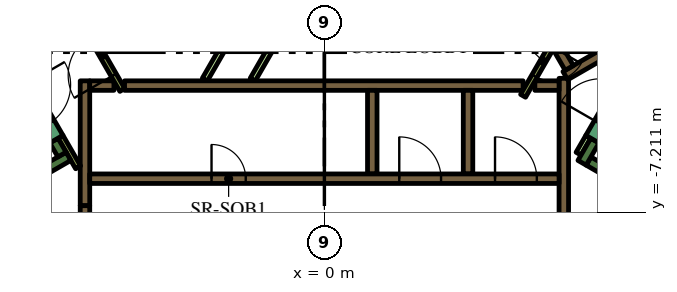
"""IFC4 building model, lengths in metres.
Left out: names, types, materials, properties, quantities, classifications, styles, units other than length and angle.
Written with IfcOpenShell. Run it as: python <this file> out.ifc"""

import sys

from ifc_helpers import new_model, si_unit, direction, frame, frame_2d, origin, place, context, subcontext, project, spatial, rectangle, extrude, element, fill, save


model = new_model("IFC4")
c1 = context("Model", 3, precision=1e-05, world=origin(), true_north=direction((0.0, 1.0)))
c2 = subcontext(c1, "Body", "Model", "MODEL_VIEW")
j1 = project(units=[si_unit("LENGTHUNIT", "METRE"), si_unit("PLANEANGLEUNIT", "RADIAN")], contexts=[c1])
p1 = place(None, origin())
s1 = spatial("IfcSite", under=j1, at=p1, CompositionType="ELEMENT")
p2 = place(p1, origin())
s2 = spatial("IfcBuilding", under=s1, at=p2, CompositionType="ELEMENT")
p3 = place(p2, frame((0.0, 0.0, 70.5)))
s3 = spatial("IfcBuildingStorey", under=s2, at=p3, CompositionType="ELEMENT", Elevation=70.5)
p4 = place(p3, frame((6.461, 13.909, 0.0), z_axis=(0.0, 0.0, 1.0), x_axis=(0.500005804227, -0.866022052686, 0.0)))
e1 = element("IfcWall", 1, at=p4, inside=s3, PredefinedType="SOLIDWALL", context=c2, shape_type="SweptSolid", body=[
    extrude(rectangle(XDim=20.834, YDim=0.9, at=frame_2d((10.417, 0.0))), origin(), (0.0, 0.0, 1.0), 3.9),
])
p5 = place(p3, frame((12.84, -9.261, 0.0), z_axis=(0.0, 0.0, 1.0), x_axis=(-0.866013990052, 0.500019768644, 0.0)))
e2 = element("IfcWall", 2, at=p5, inside=s3, PredefinedType="SOLIDWALL", context=c2, shape_type="SweptSolid", body=[
    extrude(rectangle(XDim=6.8, YDim=0.25, at=frame_2d((3.4, 0.0))), origin(), (0.0, 0.0, 1.0), 3.9),
])
p6 = place(p3, frame((6.78, -5.906, 0.0), z_axis=(0.0, 0.0, 1.0), x_axis=(0.500223362819, 0.865896406789, 0.0)))
e3 = element("IfcWall", 3, at=p6, inside=s3, PredefinedType="SOLIDWALL", context=c2, shape_type="SweptSolid", body=[
    extrude(rectangle(XDim=0.675, YDim=0.25, at=frame_2d((0.337, 0.0))), origin(), (0.0, 0.0, 1.0), 3.9),
])
p7 = place(p3, frame((-12.84, -9.261, 0.0), z_axis=(0.0, 0.0, 1.0), x_axis=(0.866016039709, 0.500016218704, 0.0)))
e4 = element("IfcWall", 4, at=p7, inside=s3, PredefinedType="SOLIDWALL", context=c2, shape_type="SweptSolid", body=[
    extrude(rectangle(XDim=7.05, YDim=0.25, at=frame_2d((3.525, 0.0))), origin(), (0.0, 0.0, 1.0), 3.9),
])
p8 = place(p3, frame((-6.905, -5.69, 0.0), z_axis=(0.0, 0.0, 1.0), x_axis=(-0.500402024738, 0.865793170242, 0.0)))
e5 = element("IfcWall", 5, at=p8, inside=s3, PredefinedType="SOLIDWALL", context=c2, shape_type="SweptSolid", body=[
    extrude(rectangle(XDim=0.425, YDim=0.25, at=frame_2d((0.212, 0.0))), origin(), (0.0, 0.0, 1.0), 3.9),
])
p9 = place(p3, frame((-5.259, -3.875, 0.0), z_axis=(0.0, 0.0, 1.0), x_axis=(1.0, 0.0, 0.0)))
e6 = element("IfcWall", 6, at=p9, inside=s3, PredefinedType="SOLIDWALL", context=c2, shape_type="SweptSolid", body=[
    extrude(rectangle(XDim=10.489, YDim=0.25, at=frame_2d((5.244, 0.0))), origin(), (0.0, 0.0, 1.0), 3.9),
])
for number, where, z_axis, x_axis in (
    (7, (3.78, -4.0, 0.0), (0.0, 0.0, 1.0), (0.0, -1.0, 0.0)),
    (8, (1.26, -4.0, 0.0), (0.0, 0.0, 1.0), (0.0, -1.0, 0.0)),
):
    element("IfcWall", number, at=place(p3, frame(where, z_axis=z_axis, x_axis=x_axis)), inside=s3, PredefinedType="SOLIDWALL", context=c2, shape_type="SweptSolid", body=[
        extrude(rectangle(XDim=2.2, YDim=0.25, at=frame_2d((1.1, 0.0))), origin(), (0.0, 0.0, 1.0), 3.9),
    ])
p10 = place(p3, frame((-6.3, -7.035, 0.0), z_axis=(0.0, 0.0, 1.0), x_axis=(0.0, 1.0, 0.0)))
e9 = element("IfcWall", 9, at=p10, inside=s3, PredefinedType="SOLIDWALL", context=c2, shape_type="SweptSolid", body=[
    extrude(rectangle(XDim=3.285, YDim=0.25, at=frame_2d((1.643, 0.0))), origin(), (0.0, 0.0, 1.0), 3.9),
])
p11 = place(p3, frame((-6.175, -3.875, 0.0), z_axis=(0.0, 0.0, 1.0), x_axis=(1.0, 0.0, 0.0)))
e10 = element("IfcWall", 10, at=p11, inside=s3, PredefinedType="SOLIDWALL", context=c2, shape_type="SweptSolid", body=[
    extrude(rectangle(XDim=0.637, YDim=0.25, at=frame_2d((0.318, 0.0))), origin(), (0.0, 0.0, 1.0), 3.9),
])
p12 = place(p3, frame((6.3, -7.27, 0.0), z_axis=(0.0, 0.0, 1.0), x_axis=(0.0, 1.0, 0.0)))
e11 = element("IfcWall", 11, at=p12, inside=s3, PredefinedType="SOLIDWALL", context=c2, shape_type="SweptSolid", body=[
    extrude(rectangle(XDim=3.586, YDim=0.25, at=frame_2d((1.793, 0.0))), origin(), (0.0, 0.0, 1.0), 3.9),
])
p13 = place(p3, frame((5.538, -3.875, 0.0), z_axis=(0.0, 0.0, 1.0), x_axis=(1.0, 0.0, 0.0)))
e12 = element("IfcWall", 12, at=p13, inside=s3, PredefinedType="SOLIDWALL", context=c2, shape_type="SweptSolid", body=[
    extrude(rectangle(XDim=0.637, YDim=0.25, at=frame_2d((0.318, 0.0))), origin(), (0.0, 0.0, 1.0), 3.9),
])
p14 = place(p3, frame((9.346, -1.879, 0.0), z_axis=(0.0, 0.0, 1.0), x_axis=(-0.866048528039, -0.499959945477, 0.0)))
e13 = element("IfcWall", 13, at=p14, inside=s3, PredefinedType="SOLIDWALL", context=c2, shape_type="SweptSolid", body=[
    extrude(rectangle(XDim=3.47, YDim=0.25, at=frame_2d((1.735, 0.0))), origin(), (0.0, 0.0, 1.0), 3.9),
])
p15 = place(p3, frame((6.13, -2.867, 0.0), z_axis=(0.0, 0.0, 1.0), x_axis=(0.500160776593, -0.865932559475, 0.0)))
e14 = element("IfcWall", 14, at=p15, inside=s3, PredefinedType="SOLIDWALL", context=c2, shape_type="SweptSolid", body=[
    extrude(rectangle(XDim=0.627, YDim=0.25, at=frame_2d((0.313, 0.0))), origin(), (0.0, 0.0, 1.0), 3.9),
])
p16 = place(p3, frame((-6.48, -6.027, 0.0), z_axis=(0.0, 0.0, 1.0), x_axis=(-0.499927229454, 0.866067413802, 0.0)))
e15 = element("IfcWall", 15, at=p16, inside=s3, PredefinedType="PARTITIONING", context=c2, shape_type="SweptSolid", body=[
    extrude(rectangle(XDim=0.929, YDim=0.15, at=frame_2d((0.464, 0.0))), origin(), (0.0, 0.0, 1.0), 3.9),
])
p17 = place(p3, frame((-3.147, -3.718, 0.0), z_axis=(0.0, 0.0, 1.0), x_axis=(0.500010131483, 0.866019554291, 0.0)))
e16 = element("IfcWall", 16, at=p17, inside=s3, PredefinedType="PARTITIONING", context=c2, shape_type="SweptSolid", body=[
    extrude(rectangle(XDim=3.894, YDim=0.15, at=frame_2d((1.947, 0.0))), origin(), (0.0, 0.0, 1.0), 2.75),
])
p18 = place(p3, frame((6.945, -5.222, 0.0), z_axis=(0.0, 0.0, 1.0), x_axis=(-0.499818422106, -0.866130212453, 0.0)))
e17 = element("IfcWall", 17, at=p18, inside=s3, PredefinedType="PARTITIONING", context=c2, shape_type="SweptSolid", body=[
    extrude(rectangle(XDim=0.514, YDim=0.15, at=frame_2d((0.257, 0.0))), origin(), (0.0, 0.0, 1.0), 2.75),
])
p19 = place(p3, frame((-1.887, -3.718, 0.0), z_axis=(0.0, 0.0, 1.0), x_axis=(0.500005008002, 0.866022512394, 0.0)))
e18 = element("IfcWall", 18, at=p19, inside=s3, PredefinedType="PARTITIONING", context=c2, shape_type="SweptSolid", body=[
    extrude(rectangle(XDim=8.327, YDim=0.15, at=frame_2d((4.164, 0.0))), origin(), (0.0, 0.0, 1.0), 2.75),
])
p20 = place(p3, frame((-6.175, -6.325, 0.0), z_axis=(0.0, 0.0, 1.0), x_axis=(1.0, 0.0, 0.0)))
e19 = element("IfcWall", 19, at=p20, inside=s3, PredefinedType="SOLIDWALL", context=c2, shape_type="SweptSolid", body=[
    extrude(rectangle(XDim=12.35, YDim=0.25, at=frame_2d((6.175, 0.0))), origin(), (0.0, 0.0, 1.0), 3.9),
])
p21 = place(p20, frame((3.205, 0.0, 0.0)))
e20 = element("IfcOpeningElement", 20, at=p21, cuts=e19, PredefinedType="OPENING", context=c2, shape_type="SweptSolid", body=[
    extrude(rectangle(XDim=0.9, YDim=2.1, at=frame_2d((0.45, 1.05))), frame((0.0, 0.135, 0.0), z_axis=(0.0, -1.0, 0.0), x_axis=(1.0, 0.0, 0.0)), (0.0, 0.0, 1.0), 0.27),
])
p22 = place(p20, frame((8.145, 0.0, 0.0)))
e21 = element("IfcOpeningElement", 21, at=p22, cuts=e19, PredefinedType="OPENING", context=c2, shape_type="SweptSolid", body=[
    extrude(rectangle(XDim=1.1, YDim=2.1, at=frame_2d((0.55, 1.05))), frame((0.0, 0.135, 0.0), z_axis=(0.0, -1.0, 0.0), x_axis=(1.0, 0.0, 0.0)), (0.0, 0.0, 1.0), 0.27),
])
p23 = place(p20, frame((10.665, 0.0, 0.0)))
e22 = element("IfcOpeningElement", 22, at=p23, cuts=e19, PredefinedType="OPENING", context=c2, shape_type="SweptSolid", body=[
    extrude(rectangle(XDim=1.1, YDim=2.1, at=frame_2d((0.55, 1.05))), frame((0.0, 0.135, 0.0), z_axis=(0.0, -1.0, 0.0), x_axis=(1.0, 0.0, 0.0)), (0.0, 0.0, 1.0), 0.27),
])
p24 = place(p3, frame((7.053, -5.284, 0.0), z_axis=(0.0, 0.0, 1.0), x_axis=(0.500078061341, 0.865980330357, 0.0)))
e23 = element("IfcWall", 23, at=p24, inside=s3, PredefinedType="SOLIDWALL", context=c2, shape_type="SweptSolid", body=[
    extrude(rectangle(XDim=2.1, YDim=0.4, at=frame_2d((1.05, 0.0))), origin(), (0.0, 0.0, 1.0), 3.9),
])
p25 = place(p24, frame((0.45, 0.0, 0.0)))
e24 = element("IfcOpeningElement", 24, at=p25, cuts=e23, PredefinedType="OPENING", context=c2, shape_type="SweptSolid", body=[
    extrude(rectangle(XDim=1.2, YDim=2.1, at=frame_2d((0.6, 1.05))), frame((0.0, 0.21, 0.0), z_axis=(0.0, -1.0, 0.0), x_axis=(1.0, 0.0, 0.0)), (0.0, 0.0, 1.0), 0.42),
])
p26 = place(p3, frame((-8.103, -3.466, 0.0), z_axis=(0.0, 0.0, 1.0), x_axis=(0.500078061341, -0.865980330357, 0.0)))
e25 = element("IfcWall", 25, at=p26, inside=s3, PredefinedType="SOLIDWALL", context=c2, shape_type="SweptSolid", body=[
    extrude(rectangle(XDim=2.1, YDim=0.4, at=frame_2d((1.05, 0.0))), origin(), (0.0, 0.0, 1.0), 3.9),
])
p27 = place(p26, frame((0.45, 0.0, 0.0)))
e26 = element("IfcOpeningElement", 26, at=p27, cuts=e25, PredefinedType="OPENING", context=c2, shape_type="SweptSolid", body=[
    extrude(rectangle(XDim=1.2, YDim=2.1, at=frame_2d((0.6, 1.05))), frame((0.0, 0.21, 0.0), z_axis=(0.0, -1.0, 0.0), x_axis=(1.0, 0.0, 0.0)), (0.0, 0.0, 1.0), 0.42),
])
p28 = place(p3, frame((-6.3, -7.035, 0.0), z_axis=(0.0, 0.0, 1.0), x_axis=(0.0, -1.0, 0.0)))
e27 = element("IfcWall", 27, at=p28, inside=s3, PredefinedType="SOLIDWALL", context=c2, shape_type="SweptSolid", body=[
    extrude(rectangle(XDim=1.8, YDim=0.25, at=frame_2d((0.9, 0.0))), origin(), (0.0, 0.0, 1.0), 3.9),
])
p29 = place(p28, frame((0.45, 0.0, 0.0)))
e28 = element("IfcOpeningElement", 28, at=p29, cuts=e27, PredefinedType="OPENING", context=c2, shape_type="SweptSolid", body=[
    extrude(rectangle(XDim=0.9, YDim=2.1, at=frame_2d((0.45, 1.05))), frame((0.0, 0.135, 0.0), z_axis=(0.0, -1.0, 0.0), x_axis=(1.0, 0.0, 0.0)), (0.0, 0.0, 1.0), 0.27),
])
p30 = place(p3, frame((6.203, -2.456, 0.0), z_axis=(0.0, 0.0, 1.0), x_axis=(-0.500043961785, -0.866000020948, 0.0)))
e29 = element("IfcWall", 29, at=p30, inside=s3, PredefinedType="PARTITIONING", context=c2, shape_type="SweptSolid", body=[
    extrude(rectangle(XDim=1.95, YDim=0.15, at=frame_2d((0.975, 0.0))), origin(), (0.0, 0.0, 1.0), 3.9),
])
p31 = place(p30, frame((0.45, 0.0, 0.0)))
e30 = element("IfcOpeningElement", 30, at=p31, cuts=e29, PredefinedType="OPENING", context=c2, shape_type="SweptSolid", body=[
    extrude(rectangle(XDim=0.9, YDim=2.1, at=frame_2d((0.45, 1.05))), frame((0.0, 0.085, 0.0), z_axis=(0.0, -1.0, 0.0), x_axis=(1.0, 0.0, 0.0)), (0.0, 0.0, 1.0), 0.17),
])
p32 = place(p3, frame((-5.317, -3.99, 0.0), z_axis=(0.0, 0.0, 1.0), x_axis=(-0.500027713859, 0.866009402589, 0.0)))
e31 = element("IfcWall", 31, at=p32, inside=s3, PredefinedType="PARTITIONING", context=c2, shape_type="SweptSolid", body=[
    extrude(rectangle(XDim=2.1, YDim=0.15, at=frame_2d((1.05, 0.0))), origin(), (0.0, 0.0, 1.0), 3.9),
])
p33 = place(p32, frame((0.45, 0.0, 0.0)))
e32 = element("IfcOpeningElement", 32, at=p33, cuts=e31, PredefinedType="OPENING", context=c2, shape_type="SweptSolid", body=[
    extrude(rectangle(XDim=1.2, YDim=2.1, at=frame_2d((0.6, 1.05))), frame((0.0, 0.085, 0.0), z_axis=(0.0, -1.0, 0.0), x_axis=(1.0, 0.0, 0.0)), (0.0, 0.0, 1.0), 0.17),
])
p34 = place(p3, frame((6.163, 18.475, 0.0), z_axis=(0.0, 0.0, 1.0), x_axis=(0.500001317485, -0.866024643133, 0.0)))
e33 = element("IfcWall", 33, at=p34, inside=s3, PredefinedType="PARTITIONING", context=c2, shape_type="SweptSolid", body=[
    extrude(rectangle(XDim=25.767, YDim=0.15, at=frame_2d((12.883, 0.0))), origin(), (0.0, 0.0, 1.0), 2.75),
])
p35 = place(p34, frame((21.138, 0.0, 0.0)))
e34 = element("IfcOpeningElement", 34, at=p35, cuts=e33, PredefinedType="OPENING", context=c2, shape_type="SweptSolid", body=[
    extrude(rectangle(XDim=1.0, YDim=2.1, at=frame_2d((0.5, 1.05))), frame((0.0, 0.085, 0.0), z_axis=(0.0, -1.0, 0.0), x_axis=(1.0, 0.0, 0.0)), (0.0, 0.0, 1.0), 0.17),
])
p36 = place(p34, frame((9.948, 0.0, 0.0)))
e35 = element("IfcOpeningElement", 35, at=p36, cuts=e33, PredefinedType="OPENING", context=c2, shape_type="SweptSolid", body=[
    extrude(rectangle(XDim=1.1, YDim=2.1, at=frame_2d((0.55, 1.05))), frame((0.0, 0.085, 0.0), z_axis=(0.0, -1.0, 0.0), x_axis=(1.0, 0.0, 0.0)), (0.0, 0.0, 1.0), 0.17),
])
p37 = place(p34, frame((8.641, 0.0, 0.0)))
e36 = element("IfcOpeningElement", 36, at=p37, cuts=e33, PredefinedType="OPENING", context=c2, shape_type="SweptSolid", body=[
    extrude(rectangle(XDim=1.0, YDim=2.1, at=frame_2d((0.5, 1.05))), frame((0.0, 0.085, 0.0), z_axis=(0.0, -1.0, 0.0), x_axis=(1.0, 0.0, 0.0)), (0.0, 0.0, 1.0), 0.17),
])
p38 = place(p34, frame((0.18, 0.0, 0.0)))
e37 = element("IfcOpeningElement", 37, at=p38, cuts=e33, PredefinedType="OPENING", context=c2, shape_type="SweptSolid", body=[
    extrude(rectangle(XDim=1.0, YDim=2.1, at=frame_2d((0.5, 1.05))), frame((0.0, 0.085, 0.0), z_axis=(0.0, -1.0, 0.0), x_axis=(1.0, 0.0, 0.0)), (0.0, 0.0, 1.0), 0.17),
])
p39 = place(p3, frame((-19.081, -3.9, 0.0), z_axis=(0.0, 0.0, 1.0), x_axis=(0.499998313975, 0.866026377209, 0.0)))
e38 = element("IfcWall", 38, at=p39, inside=s3, PredefinedType="PARTITIONING", context=c2, shape_type="SweptSolid", body=[
    extrude(rectangle(XDim=25.766, YDim=0.15, at=frame_2d((12.883, 0.0))), origin(), (0.0, 0.0, 1.0), 2.75),
])
p40 = place(p39, frame((24.586, 0.0, 0.0)))
e39 = element("IfcOpeningElement", 39, at=p40, cuts=e38, PredefinedType="OPENING", context=c2, shape_type="SweptSolid", body=[
    extrude(rectangle(XDim=1.0, YDim=2.1, at=frame_2d((0.5, 1.05))), frame((0.0, 0.085, 0.0), z_axis=(0.0, -1.0, 0.0), x_axis=(1.0, 0.0, 0.0)), (0.0, 0.0, 1.0), 0.17),
])
p41 = place(p39, frame((9.948, 0.0, 0.0)))
e40 = element("IfcOpeningElement", 40, at=p41, cuts=e38, PredefinedType="OPENING", context=c2, shape_type="SweptSolid", body=[
    extrude(rectangle(XDim=1.0, YDim=2.1, at=frame_2d((0.5, 1.05))), frame((0.0, 0.085, 0.0), z_axis=(0.0, -1.0, 0.0), x_axis=(1.0, 0.0, 0.0)), (0.0, 0.0, 1.0), 0.17),
])
p42 = place(p39, frame((7.782, 0.0, 0.0)))
e41 = element("IfcOpeningElement", 41, at=p42, cuts=e38, PredefinedType="OPENING", context=c2, shape_type="SweptSolid", body=[
    extrude(rectangle(XDim=0.9, YDim=2.1, at=frame_2d((0.45, 1.05))), frame((0.0, 0.085, 0.0), z_axis=(0.0, -1.0, 0.0), x_axis=(1.0, 0.0, 0.0)), (0.0, 0.0, 1.0), 0.17),
])
p43 = place(p39, frame((4.658, 0.0, 0.0)))
e42 = element("IfcOpeningElement", 42, at=p43, cuts=e38, PredefinedType="OPENING", context=c2, shape_type="SweptSolid", body=[
    extrude(rectangle(XDim=0.9, YDim=2.1, at=frame_2d((0.45, 1.05))), frame((0.0, 0.085, 0.0), z_axis=(0.0, -1.0, 0.0), x_axis=(1.0, 0.0, 0.0)), (0.0, 0.0, 1.0), 0.17),
])
p44 = place(p21, origin())
e43 = element("IfcDoor", 43, at=p44, inside=s3, OperationType="SINGLE_SWING_LEFT", PredefinedType="DOOR", context=c2, shape_type="SweptSolid", body=[
    extrude(rectangle(XDim=0.9, YDim=2.1, at=frame_2d((0.45, 1.05))), frame((0.0, 0.025, 0.0), z_axis=(0.0, -1.0, 0.0), x_axis=(1.0, 0.0, 0.0)), (0.0, 0.0, 1.0), 0.05),
])
fill(e20, e43)
p45 = place(p22, origin())
e44 = element("IfcDoor", 44, at=p45, inside=s3, OperationType="DOUBLE_DOOR_SLIDING", PredefinedType="DOOR", context=c2, shape_type="SweptSolid", body=[
    extrude(rectangle(XDim=1.1, YDim=2.1, at=frame_2d((0.55, 1.05))), frame((0.0, 0.025, 0.0), z_axis=(0.0, -1.0, 0.0), x_axis=(1.0, 0.0, 0.0)), (0.0, 0.0, 1.0), 0.05),
])
fill(e21, e44)
p46 = place(p23, origin())
e45 = element("IfcDoor", 45, at=p46, inside=s3, OperationType="DOUBLE_DOOR_SLIDING", PredefinedType="DOOR", context=c2, shape_type="SweptSolid", body=[
    extrude(rectangle(XDim=1.1, YDim=2.1, at=frame_2d((0.55, 1.05))), frame((0.0, 0.025, 0.0), z_axis=(0.0, -1.0, 0.0), x_axis=(1.0, 0.0, 0.0)), (0.0, 0.0, 1.0), 0.05),
])
fill(e22, e45)
p47 = place(p31, origin())
e46 = element("IfcDoor", 46, at=p47, inside=s3, OperationType="SINGLE_SWING_LEFT", PredefinedType="DOOR", context=c2, shape_type="SweptSolid", body=[
    extrude(rectangle(XDim=0.9, YDim=2.1, at=frame_2d((0.45, 1.05))), frame((0.0, 0.025, 0.0), z_axis=(0.0, -1.0, 0.0), x_axis=(1.0, 0.0, 0.0)), (0.0, 0.0, 1.0), 0.05),
])
fill(e30, e46)
p48 = place(p33, origin())
e47 = element("IfcDoor", 47, at=p48, inside=s3, OperationType="SINGLE_SWING_LEFT", PredefinedType="DOOR", context=c2, shape_type="SweptSolid", body=[
    extrude(rectangle(XDim=1.2, YDim=2.1, at=frame_2d((0.6, 1.05))), frame((0.0, 0.025, 0.0), z_axis=(0.0, -1.0, 0.0), x_axis=(1.0, 0.0, 0.0)), (0.0, 0.0, 1.0), 0.05),
])
fill(e32, e47)
save(model, sys.argv[1])
